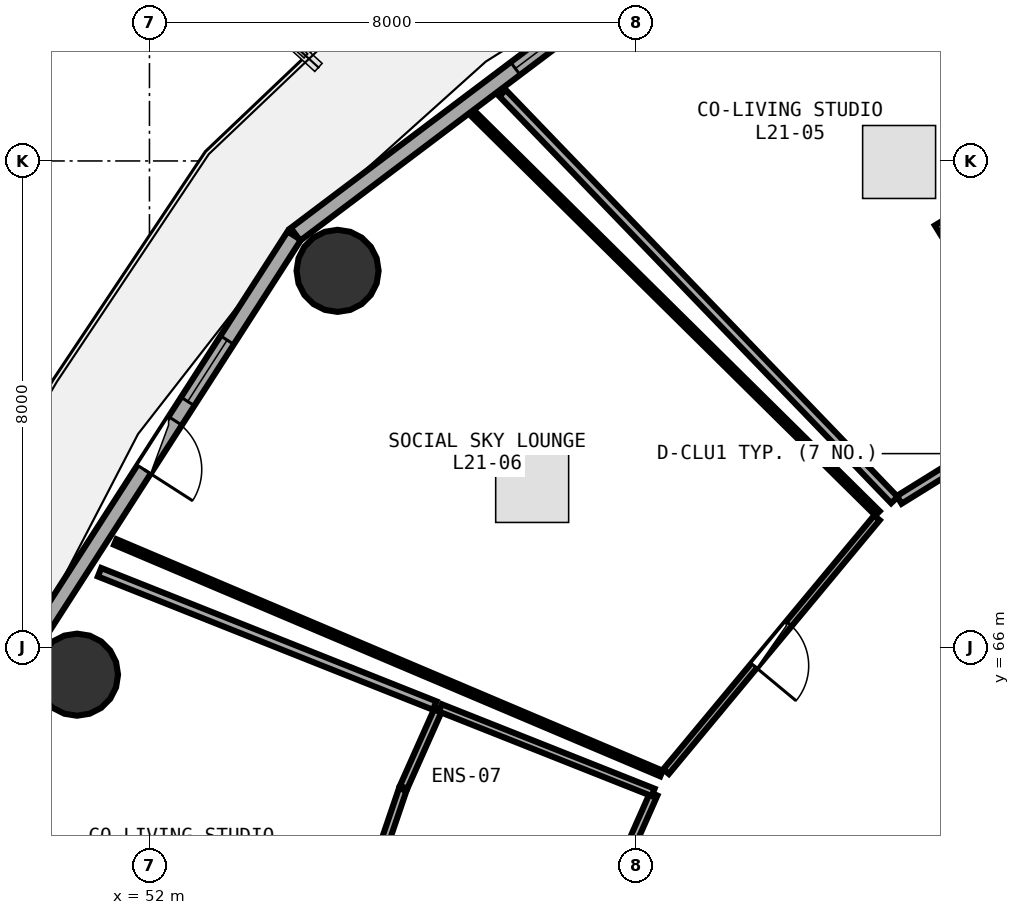
"""IFC4 building model, lengths in metres.
Left out: names, types, materials, properties, quantities, classifications, styles, units other than length and angle.
Written with IfcOpenShell. Run it as: python <this file> out.ifc"""

import sys

from ifc_helpers import new_model, si_unit, direction, frame, frame_2d, origin, origin_2d, place, context, subcontext, project, spatial, rectangle, circle, extrude, element, fill, save


model = new_model("IFC4")
c1 = context("Model", 3, precision=1e-05, world=origin(), true_north=direction((0.0, 1.0)))
c2 = subcontext(c1, "Body", "Model", "MODEL_VIEW")
j1 = project(units=[si_unit("LENGTHUNIT", "METRE"), si_unit("PLANEANGLEUNIT", "RADIAN")], contexts=[c1])
p1 = place(None, origin())
s1 = spatial("IfcSite", under=j1, at=p1, CompositionType="ELEMENT")
p2 = place(p1, origin())
s2 = spatial("IfcBuilding", under=s1, at=p2, CompositionType="ELEMENT")
p3 = place(p2, frame((0.0, 0.0, 83.85)))
s3 = spatial("IfcBuildingStorey", under=s2, at=p3, CompositionType="ELEMENT", Elevation=83.85)
for number, where, z_axis, x_axis in (
    (1, (55.094, 72.193, 0.0), (0.0, 0.0, 1.0), (1.0, 0.0, 0.0)),
    (2, (50.808, 65.552, 0.0), (0.0, 0.0, 1.0), (1.0, 0.0, 0.0)),
):
    element("IfcColumn", number, at=place(p3, frame(where, z_axis=z_axis, x_axis=x_axis)), inside=s3, PredefinedType="COLUMN", context=c2, shape_type="SweptSolid", body=[
        extrude(circle(Radius=0.675, at=origin_2d()), origin(), (0.0, 0.0, 1.0), 3.75),
    ])
p4 = place(p3, frame((61.188, 77.91, 0.0), z_axis=(0.0, 0.0, 1.0), x_axis=(-0.798501507879, -0.601992808857, 0.0)))
e3 = element("IfcWall", 3, at=p4, inside=s3, PredefinedType="SOLIDWALL", context=c2, shape_type="SweptSolid", body=[
    extrude(rectangle(XDim=8.499, YDim=0.26, at=frame_2d((4.25, 0.0))), origin(), (0.0, 0.0, 1.0), 3.475),
])
p5 = place(p4, frame((2.37, 0.0, 0.85)))
e4 = element("IfcOpeningElement", 4, at=p5, cuts=e3, PredefinedType="OPENING", context=c2, shape_type="SweptSolid", body=[
    extrude(rectangle(XDim=1.6, YDim=1.45, at=frame_2d((0.8, 0.725))), frame((0.0, 0.14, 0.0), z_axis=(0.0, -1.0, 0.0), x_axis=(1.0, 0.0, 0.0)), (0.0, 0.0, 1.0), 0.28),
])
p6 = place(p3, frame((54.381, 72.771, 0.0), z_axis=(0.0, 0.0, 1.0), x_axis=(-0.540620528459, -0.841266571432, 0.0)))
e5 = element("IfcWall", 5, at=p6, inside=s3, PredefinedType="SOLIDWALL", context=c2, shape_type="SweptSolid", body=[
    extrude(rectangle(XDim=8.193, YDim=0.26, at=frame_2d((4.096, 0.0))), origin(), (0.0, 0.0, 1.0), 3.475),
])
p7 = place(p6, frame((3.621, 0.0, 0.0)))
e6 = element("IfcOpeningElement", 6, at=p7, cuts=e5, PredefinedType="OPENING", context=c2, shape_type="SweptSolid", body=[
    extrude(rectangle(XDim=0.95, YDim=2.1, at=frame_2d((0.475, 1.05))), frame((0.0, 0.14, 0.0), z_axis=(0.0, -1.0, 0.0), x_axis=(1.0, 0.0, 0.0)), (0.0, 0.0, 1.0), 0.28),
])
p8 = place(p6, frame((2.041, 0.0, 0.85)))
e7 = element("IfcOpeningElement", 7, at=p8, cuts=e5, PredefinedType="OPENING", context=c2, shape_type="SweptSolid", body=[
    extrude(rectangle(XDim=1.2, YDim=1.45, at=frame_2d((0.6, 0.725))), frame((0.0, 0.14, 0.0), z_axis=(0.0, -1.0, 0.0), x_axis=(1.0, 0.0, 0.0)), (0.0, 0.0, 1.0), 0.28),
])
p9 = place(p3, frame((66.779, 69.947, 0.0), z_axis=(0.0, 0.0, 1.0), x_axis=(-0.849569495091, -0.527476703761, 0.0)))
e8 = element("IfcWall", 8, at=p9, inside=s3, PredefinedType="PARTITIONING", context=c2, shape_type="SweptSolid", body=[
    extrude(rectangle(XDim=2.883, YDim=0.15, at=frame_2d((1.441, 0.0))), origin(), (0.0, 0.0, 1.0), 2.925),
])
p10 = place(p9, frame((0.966, 0.0, 0.0)))
e9 = element("IfcOpeningElement", 9, at=p10, cuts=e8, PredefinedType="OPENING", context=c2, shape_type="SweptSolid", body=[
    extrude(rectangle(XDim=0.95, YDim=2.08, at=frame_2d((0.475, 1.04))), frame((0.0, 0.085, 0.0), z_axis=(0.0, -1.0, 0.0), x_axis=(1.0, 0.0, 0.0)), (0.0, 0.0, 1.0), 0.17),
])
p11 = place(p3, frame((63.964, 68.131, 0.0), z_axis=(0.0, 0.0, 1.0), x_axis=(-0.639104047727, -0.769120287198, 0.0)))
e10 = element("IfcWall", 10, at=p11, inside=s3, PredefinedType="PARTITIONING", context=c2, shape_type="SweptSolid", body=[
    extrude(rectangle(XDim=5.427, YDim=0.12, at=frame_2d((2.713, 0.0))), origin(), (0.0, 0.0, 1.0), 2.925),
])
p12 = place(p11, frame((2.263, 0.0, 0.0)))
e11 = element("IfcOpeningElement", 11, at=p12, cuts=e10, PredefinedType="OPENING", context=c2, shape_type="SweptSolid", body=[
    extrude(rectangle(XDim=0.9, YDim=2.08, at=frame_2d((0.45, 1.04))), frame((0.0, 0.07, 0.0), z_axis=(0.0, -1.0, 0.0), x_axis=(1.0, 0.0, 0.0)), (0.0, 0.0, 1.0), 0.14),
])
p13 = place(p3, frame((64.251, 68.424, 0.0), z_axis=(0.0, 0.0, 1.0), x_axis=(-0.693645221886, 0.720316809574, 0.0)))
e12 = element("IfcWall", 12, at=p13, inside=s3, PredefinedType="PARTITIONING", context=c2, shape_type="SweptSolid", body=[
    extrude(rectangle(XDim=9.291, YDim=0.15, at=frame_2d((4.646, 0.0))), origin(), (0.0, 0.0, 1.0), 2.975),
])
p14 = place(p3, frame((64.981, 72.979, 0.0), z_axis=(0.0, 0.0, 1.0), x_axis=(0.524609403226, -0.851343041345, 0.0)))
e13 = element("IfcWall", 13, at=p14, inside=s3, PredefinedType="PARTITIONING", context=c2, shape_type="SweptSolid", body=[
    extrude(rectangle(XDim=1.33, YDim=0.15, at=frame_2d((0.665, 0.0))), origin(), (0.0, 0.0, 1.0), 3.175),
])
p15 = place(p3, frame((60.42, 63.927, 0.0), z_axis=(0.0, 0.0, 1.0), x_axis=(-0.920723225206, 0.390216276654, 0.0)))
e14 = element("IfcWall", 14, at=p15, inside=s3, PredefinedType="PARTITIONING", context=c2, shape_type="SweptSolid", body=[
    extrude(rectangle(XDim=9.756, YDim=0.1, at=frame_2d((4.878, 0.0))), origin(), (0.0, 0.0, 1.0), 2.925),
])
p16 = place(p3, frame((57.344, 74.756, 0.0), z_axis=(0.0, 0.0, 1.0), x_axis=(0.711285789258, -0.702902927864, 0.0)))
e15 = element("IfcWall", 15, at=p16, inside=s3, PredefinedType="PARTITIONING", context=c2, shape_type="SweptSolid", body=[
    extrude(rectangle(XDim=9.32, YDim=0.1, at=frame_2d((4.66, 0.0))), origin(), (0.0, 0.0, 1.0), 2.975),
])
p17 = place(p3, frame((60.294, 63.591, 0.0), z_axis=(0.0, 0.0, 1.0), x_axis=(-0.40547338745, -0.914106849372, 0.0)))
e16 = element("IfcWall", 16, at=p17, inside=s3, PredefinedType="PLUMBINGWALL", context=c2, shape_type="SweptSolid", body=[
    extrude(rectangle(XDim=1.124, YDim=0.13, at=frame_2d((0.562, 0.0))), origin(), (0.0, 0.0, 1.0), 3.235),
])
p18 = place(p3, frame((55.711, 62.331, 0.0), z_axis=(0.0, 0.0, 1.0), x_axis=(0.322409215332, 0.946600389747, 0.0)))
e17 = element("IfcWall", 17, at=p18, inside=s3, PredefinedType="PLUMBINGWALL", context=c2, shape_type="SweptSolid", body=[
    extrude(rectangle(XDim=1.408, YDim=0.13, at=frame_2d((0.704, 0.0))), origin(), (0.0, 0.0, 1.0), 3.48),
])
p19 = place(p3, frame((56.18, 63.701, 0.0), z_axis=(0.0, 0.0, 1.0), x_axis=(0.407258007738, 0.913313152831, 0.0)))
e18 = element("IfcWall", 18, at=p19, inside=s3, PredefinedType="PLUMBINGWALL", context=c2, shape_type="SweptSolid", body=[
    extrude(rectangle(XDim=1.416, YDim=0.13, at=frame_2d((0.708, 0.0))), origin(), (0.0, 0.0, 1.0), 3.175),
])
p20 = place(p3, frame((56.784, 65.006, 0.0), z_axis=(0.0, 0.0, 1.0), x_axis=(0.929457187308, -0.368929989242, 0.0)))
e19 = element("IfcWall", 19, at=p20, inside=s3, PredefinedType="PLUMBINGWALL", context=c2, shape_type="SweptSolid", body=[
    extrude(rectangle(XDim=3.765, YDim=0.13, at=frame_2d((1.883, 0.0))), origin(), (0.0, 0.0, 1.0), 3.175),
])
p21 = place(p3, frame((51.179, 67.236, 0.0), z_axis=(0.0, 0.0, 1.0), x_axis=(0.929212756669, -0.369545197294, 0.0)))
e20 = element("IfcWall", 20, at=p21, inside=s3, PredefinedType="PARTITIONING", context=c2, shape_type="SweptSolid", body=[
    extrude(rectangle(XDim=5.933, YDim=0.15, at=frame_2d((2.966, 0.0))), origin(), (0.0, 0.0, 1.0), 2.925),
])
p22 = place(p5, origin())
e21 = element("IfcWindow", 21, at=p22, inside=s3, PartitioningType="SINGLE_PANEL", PredefinedType="WINDOW", context=c2, shape_type="SweptSolid", body=[
    extrude(rectangle(XDim=1.6, YDim=1.45, at=frame_2d((0.8, 0.725))), frame((0.0, 0.03, 0.0), z_axis=(0.0, -1.0, 0.0), x_axis=(1.0, 0.0, 0.0)), (0.0, 0.0, 1.0), 0.06),
])
fill(e4, e21)
p23 = place(p7, frame((0.95, 0.0, 0.0), z_axis=(0.0, 0.0, 1.0), x_axis=(-1.0, 0.0, 0.0)))
e22 = element("IfcDoor", 22, at=p23, inside=s3, OperationType="SINGLE_SWING_LEFT", PredefinedType="DOOR", context=c2, shape_type="SweptSolid", body=[
    extrude(rectangle(XDim=0.95, YDim=2.1, at=frame_2d((0.475, 1.05))), frame((0.0, 0.025, 0.0), z_axis=(0.0, -1.0, 0.0), x_axis=(1.0, 0.0, 0.0)), (0.0, 0.0, 1.0), 0.05),
])
fill(e6, e22)
p24 = place(p8, origin())
e23 = element("IfcWindow", 23, at=p24, inside=s3, PartitioningType="SINGLE_PANEL", PredefinedType="WINDOW", context=c2, shape_type="SweptSolid", body=[
    extrude(rectangle(XDim=1.2, YDim=1.45, at=frame_2d((0.6, 0.725))), frame((0.0, 0.03, 0.0), z_axis=(0.0, -1.0, 0.0), x_axis=(1.0, 0.0, 0.0)), (0.0, 0.0, 1.0), 0.06),
])
fill(e7, e23)
p25 = place(p12, origin())
e24 = element("IfcDoor", 24, at=p25, inside=s3, OperationType="SINGLE_SWING_RIGHT", PredefinedType="DOOR", context=c2, shape_type="SweptSolid", body=[
    extrude(rectangle(XDim=0.9, YDim=2.08, at=frame_2d((0.45, 1.04))), frame((0.0, 0.025, 0.0), z_axis=(0.0, -1.0, 0.0), x_axis=(1.0, 0.0, 0.0)), (0.0, 0.0, 1.0), 0.05),
])
fill(e11, e24)
save(model, sys.argv[1])
